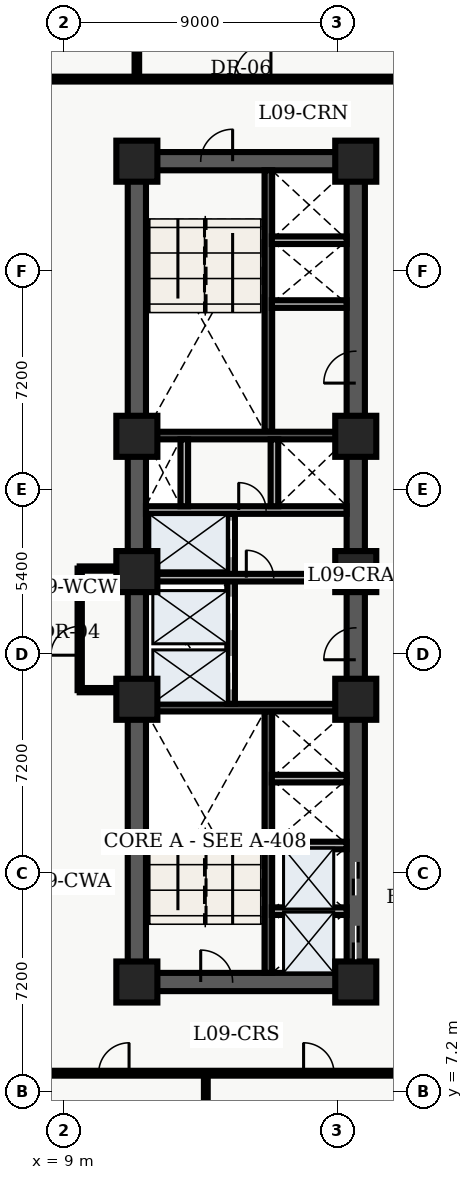
"""IFC4 building model, lengths in metres.
Left out: names, types, materials, properties, quantities, classifications, styles, units other than length and angle.
Written with IfcOpenShell. Run it as: python <this file> out.ifc"""

import sys

from ifc_helpers import new_model, entity, si_unit, converted_unit, direction, frame, origin_with_axes, origin_2d_with_axis, place, context, subcontext, project, spatial, polyline, rectangle, outline, extrude, element, fill, save


model = new_model("IFC4")
c1 = context("Model", 3, precision=1e-05, world=origin_with_axes(), true_north=direction((0.0, 1.0)))
c2 = subcontext(c1, "Body", "Model", "MODEL_VIEW")
j1 = project(units=[si_unit("LENGTHUNIT", "METRE"), converted_unit("PLANEANGLEUNIT", "DEGREE", entity("IfcPlaneAngleMeasure", 0.017), si_unit("PLANEANGLEUNIT", "RADIAN"), dimensions=[0, 0, 0, 0, 0, 0, 0])], contexts=[c1])
p1 = place(None, origin_with_axes())
s1 = spatial("IfcSite", under=j1, at=p1, CompositionType="ELEMENT")
p2 = place(p1, origin_with_axes())
s2 = spatial("IfcBuilding", under=s1, at=p2, CompositionType="ELEMENT")
p3 = place(p2, frame((0.0, 0.0, 40.5), z_axis=(0.0, 0.0, 1.0), x_axis=(1.0, 0.0, 0.0)))
s3 = spatial("IfcBuildingStorey", under=s2, at=p3, CompositionType="ELEMENT", Elevation=40.5)
p4 = place(p3, frame((11.4, 10.8, 0.0), z_axis=(0.0, 0.0, 1.0), x_axis=(0.0, 1.0, 0.0)))
e1 = element("IfcWall", 1, at=p4, inside=s3, PredefinedType="SHEAR", context=c2, shape_type="SweptSolid", body=[
    extrude(outline(polyline([(0.0, -0.3), (27.0, -0.3), (27.0, 0.3), (0.0, 0.3), (0.0, -0.3)])), origin_with_axes(), (0.0, 0.0, 1.0), 3.66),
])
p5 = place(p3, frame((11.4, 10.8, 0.0), z_axis=(0.0, 0.0, 1.0), x_axis=(1.0, 0.0, 0.0)))
e2 = element("IfcWall", 2, at=p5, inside=s3, PredefinedType="SHEAR", context=c2, shape_type="SweptSolid", body=[
    extrude(outline(polyline([(0.0, -0.3), (7.2, -0.3), (7.2, 0.3), (0.0, 0.3), (0.0, -0.3)])), origin_with_axes(), (0.0, 0.0, 1.0), 3.66),
])
p6 = place(p5, frame((2.625, 0.0, 0.0), z_axis=(0.0, 0.0, 1.0), x_axis=(1.0, 0.0, 0.0)))
e3 = element("IfcOpeningElement", 3, at=p6, cuts=e2, PredefinedType="OPENING", context=c2, shape_type="SweptSolid", body=[
    extrude(rectangle(XDim=1.05, YDim=0.62, at=origin_2d_with_axis()), origin_with_axes(), (0.0, 0.0, 1.0), 2.15),
])
p7 = place(p3, frame((11.4, 37.8, 0.0), z_axis=(0.0, 0.0, 1.0), x_axis=(1.0, 0.0, 0.0)))
e4 = element("IfcWall", 4, at=p7, inside=s3, PredefinedType="SHEAR", context=c2, shape_type="SweptSolid", body=[
    extrude(outline(polyline([(0.0, -0.3), (7.2, -0.3), (7.2, 0.3), (0.0, 0.3), (0.0, -0.3)])), origin_with_axes(), (0.0, 0.0, 1.0), 3.66),
])
p8 = place(p7, frame((2.625, 0.0, 0.0), z_axis=(0.0, 0.0, 1.0), x_axis=(1.0, 0.0, 0.0)))
e5 = element("IfcOpeningElement", 5, at=p8, cuts=e4, PredefinedType="OPENING", context=c2, shape_type="SweptSolid", body=[
    extrude(rectangle(XDim=1.05, YDim=0.62, at=origin_2d_with_axis()), origin_with_axes(), (0.0, 0.0, 1.0), 2.15),
])
p9 = place(p3, frame((18.6, 10.8, 0.0), z_axis=(0.0, 0.0, 1.0), x_axis=(0.0, 1.0, 0.0)))
e6 = element("IfcWall", 6, at=p9, inside=s3, PredefinedType="SHEAR", context=c2, shape_type="SweptSolid", body=[
    extrude(outline(polyline([(0.0, -0.3), (13.5, -0.3), (13.5, 0.3), (0.0, 0.3), (0.0, -0.3)])), origin_with_axes(), (0.0, 0.0, 1.0), 3.66),
])
p10 = place(p9, frame((1.3, 0.0, 0.0), z_axis=(0.0, 0.0, 1.0), x_axis=(1.0, 0.0, 0.0)))
e7 = element("IfcOpeningElement", 7, at=p10, cuts=e6, PredefinedType="OPENING", context=c2, shape_type="SweptSolid", body=[
    extrude(rectangle(XDim=1.1, YDim=0.62, at=origin_2d_with_axis()), origin_with_axes(), (0.0, 0.0, 1.0), 2.15),
])
p11 = place(p9, frame((3.4, 0.0, 0.0), z_axis=(0.0, 0.0, 1.0), x_axis=(1.0, 0.0, 0.0)))
e8 = element("IfcOpeningElement", 8, at=p11, cuts=e6, PredefinedType="OPENING", context=c2, shape_type="SweptSolid", body=[
    extrude(rectangle(XDim=1.1, YDim=0.62, at=origin_2d_with_axis()), origin_with_axes(), (0.0, 0.0, 1.0), 2.15),
])
p12 = place(p9, frame((11.125, 0.0, 0.0), z_axis=(0.0, 0.0, 1.0), x_axis=(1.0, 0.0, 0.0)))
e9 = element("IfcOpeningElement", 9, at=p12, cuts=e6, PredefinedType="OPENING", context=c2, shape_type="SweptSolid", body=[
    extrude(rectangle(XDim=1.05, YDim=0.62, at=origin_2d_with_axis()), origin_with_axes(), (0.0, 0.0, 1.0), 2.15),
])
p13 = place(p3, frame((18.6, 24.3, 0.0), z_axis=(0.0, 0.0, 1.0), x_axis=(0.0, 1.0, 0.0)))
e10 = element("IfcWall", 10, at=p13, inside=s3, PredefinedType="SHEAR", context=c2, shape_type="SweptSolid", body=[
    extrude(outline(polyline([(0.0, -0.3), (13.5, -0.3), (13.5, 0.3), (0.0, 0.3), (0.0, -0.3)])), origin_with_axes(), (0.0, 0.0, 1.0), 3.66),
])
p14 = place(p13, frame((6.725, 0.0, 0.0), z_axis=(0.0, 0.0, 1.0), x_axis=(1.0, 0.0, 0.0)))
e11 = element("IfcOpeningElement", 11, at=p14, cuts=e10, PredefinedType="OPENING", context=c2, shape_type="SweptSolid", body=[
    extrude(rectangle(XDim=1.05, YDim=0.62, at=origin_2d_with_axis()), origin_with_axes(), (0.0, 0.0, 1.0), 2.15),
])
p15 = place(p3, frame((15.725, 11.1, 0.0), z_axis=(0.0, 0.0, 1.0), x_axis=(0.0, 1.0, 0.0)))
e12 = element("IfcWall", 12, at=p15, inside=s3, PredefinedType="SHEAR", context=c2, shape_type="SweptSolid", body=[
    extrude(outline(polyline([(0.0, -0.125), (8.6, -0.125), (8.6, 0.125), (0.0, 0.125), (0.0, -0.125)])), origin_with_axes(), (0.0, 0.0, 1.0), 3.66),
])
p16 = place(p3, frame((11.7, 19.825, 0.0), z_axis=(0.0, 0.0, 1.0), x_axis=(1.0, 0.0, 0.0)))
e13 = element("IfcWall", 13, at=p16, inside=s3, PredefinedType="SHEAR", context=c2, shape_type="SweptSolid", body=[
    extrude(outline(polyline([(0.0, -0.125), (6.6, -0.125), (6.6, 0.125), (0.0, 0.125), (0.0, -0.125)])), origin_with_axes(), (0.0, 0.0, 1.0), 3.66),
])
p17 = place(p3, frame((15.725, 28.9, 0.0), z_axis=(0.0, 0.0, 1.0), x_axis=(0.0, 1.0, 0.0)))
e14 = element("IfcWall", 14, at=p17, inside=s3, PredefinedType="SHEAR", context=c2, shape_type="SweptSolid", body=[
    extrude(outline(polyline([(0.0, -0.125), (8.6, -0.125), (8.6, 0.125), (0.0, 0.125), (0.0, -0.125)])), origin_with_axes(), (0.0, 0.0, 1.0), 3.66),
])
p18 = place(p3, frame((11.7, 28.775, 0.0), z_axis=(0.0, 0.0, 1.0), x_axis=(1.0, 0.0, 0.0)))
e15 = element("IfcWall", 15, at=p18, inside=s3, PredefinedType="SHEAR", context=c2, shape_type="SweptSolid", body=[
    extrude(outline(polyline([(0.0, -0.125), (6.6, -0.125), (6.6, 0.125), (0.0, 0.125), (0.0, -0.125)])), origin_with_axes(), (0.0, 0.0, 1.0), 3.66),
])
p19 = place(p3, frame((14.5, 19.95, 0.0), z_axis=(0.0, 0.0, 1.0), x_axis=(0.0, 1.0, 0.0)))
e16 = element("IfcWall", 16, at=p19, inside=s3, PredefinedType="SOLIDWALL", context=c2, shape_type="SweptSolid", body=[
    extrude(outline(polyline([(0.0, -0.125), (6.25, -0.125), (6.25, 0.125), (0.0, 0.125), (0.0, -0.125)])), origin_with_axes(), (0.0, 0.0, 1.0), 2.7),
])
p20 = place(p19, frame((1.025, 0.0, 0.0), z_axis=(0.0, 0.0, 1.0), x_axis=(1.0, 0.0, 0.0)))
e17 = element("IfcOpeningElement", 17, at=p20, cuts=e16, PredefinedType="OPENING", context=c2, shape_type="SweptSolid", body=[
    extrude(rectangle(XDim=1.1, YDim=0.27, at=origin_2d_with_axis()), origin_with_axes(), (0.0, 0.0, 1.0), 2.15),
])
p21 = place(p19, frame((2.975, 0.0, 0.0), z_axis=(0.0, 0.0, 1.0), x_axis=(1.0, 0.0, 0.0)))
e18 = element("IfcOpeningElement", 18, at=p21, cuts=e16, PredefinedType="OPENING", context=c2, shape_type="SweptSolid", body=[
    extrude(rectangle(XDim=1.1, YDim=0.27, at=origin_2d_with_axis()), origin_with_axes(), (0.0, 0.0, 1.0), 2.15),
])
p22 = place(p19, frame((5.425, 0.0, 0.0), z_axis=(0.0, 0.0, 1.0), x_axis=(1.0, 0.0, 0.0)))
e19 = element("IfcOpeningElement", 19, at=p22, cuts=e16, PredefinedType="OPENING", context=c2, shape_type="SweptSolid", body=[
    extrude(rectangle(XDim=1.2, YDim=0.27, at=origin_2d_with_axis()), origin_with_axes(), (0.0, 0.0, 1.0), 2.15),
])
p23 = place(p3, frame((11.7, 24.1, 0.0), z_axis=(0.0, 0.0, 1.0), x_axis=(1.0, 0.0, 0.0)))
e20 = element("IfcWall", 20, at=p23, inside=s3, PredefinedType="SOLIDWALL", context=c2, shape_type="SweptSolid", body=[
    extrude(outline(polyline([(0.0, -0.125), (6.6, -0.125), (6.6, 0.125), (0.0, 0.125), (0.0, -0.125)])), origin_with_axes(), (0.0, 0.0, 1.0), 2.7),
])
p24 = place(p23, frame((3.75, 0.0, 0.0), z_axis=(0.0, 0.0, 1.0), x_axis=(1.0, 0.0, 0.0)))
e21 = element("IfcOpeningElement", 21, at=p24, cuts=e20, PredefinedType="OPENING", context=c2, shape_type="SweptSolid", body=[
    extrude(rectangle(XDim=0.9, YDim=0.27, at=origin_2d_with_axis()), origin_with_axes(), (0.0, 0.0, 1.0), 2.15),
])
p25 = place(p3, frame((11.7, 26.325, 0.0), z_axis=(0.0, 0.0, 1.0), x_axis=(1.0, 0.0, 0.0)))
e22 = element("IfcWall", 22, at=p25, inside=s3, PredefinedType="SOLIDWALL", context=c2, shape_type="SweptSolid", body=[
    extrude(outline(polyline([(0.0, -0.125), (6.6, -0.125), (6.6, 0.125), (0.0, 0.125), (0.0, -0.125)])), origin_with_axes(), (0.0, 0.0, 1.0), 2.7),
])
p26 = place(p25, frame((3.5, 0.0, 0.0), z_axis=(0.0, 0.0, 1.0), x_axis=(1.0, 0.0, 0.0)))
e23 = element("IfcOpeningElement", 23, at=p26, cuts=e22, PredefinedType="OPENING", context=c2, shape_type="SweptSolid", body=[
    extrude(rectangle(XDim=0.9, YDim=0.27, at=origin_2d_with_axis()), origin_with_axes(), (0.0, 0.0, 1.0), 2.15),
])
for number, where, z_axis, x_axis in (
    (24, (12.96, 26.45, 0.0), (0.0, 0.0, 1.0), (0.0, 1.0, 0.0)),
    (25, (15.925, 26.45, 0.0), (0.0, 0.0, 1.0), (0.0, 1.0, 0.0)),
):
    element("IfcWall", number, at=place(p3, frame(where, z_axis=z_axis, x_axis=x_axis)), inside=s3, PredefinedType="SOLIDWALL", context=c2, shape_type="SweptSolid", body=[
        extrude(outline(polyline([(0.0, -0.125), (2.2, -0.125), (2.2, 0.125), (0.0, 0.125), (0.0, -0.125)])), origin_with_axes(), (0.0, 0.0, 1.0), 2.7),
    ])
for number, where, z_axis, x_axis in (
    (26, (11.4, 10.8, 0.0), (0.0, 0.0, 1.0), (1.0, 0.0, 0.0)),
    (27, (11.4, 20.1, 0.0), (0.0, 0.0, 1.0), (1.0, 0.0, 0.0)),
    (28, (11.4, 24.3, 0.0), (0.0, 0.0, 1.0), (1.0, 0.0, 0.0)),
    (29, (11.4, 28.75, 0.0), (0.0, 0.0, 1.0), (1.0, 0.0, 0.0)),
    (30, (11.4, 37.8, 0.0), (0.0, 0.0, 1.0), (1.0, 0.0, 0.0)),
    (31, (18.6, 10.8, 0.0), (0.0, 0.0, 1.0), (1.0, 0.0, 0.0)),
    (32, (18.6, 20.1, 0.0), (0.0, 0.0, 1.0), (1.0, 0.0, 0.0)),
    (33, (18.6, 24.3, 0.0), (0.0, 0.0, 1.0), (1.0, 0.0, 0.0)),
    (34, (18.6, 28.75, 0.0), (0.0, 0.0, 1.0), (1.0, 0.0, 0.0)),
    (35, (18.6, 37.8, 0.0), (0.0, 0.0, 1.0), (1.0, 0.0, 0.0)),
):
    element("IfcColumn", number, at=place(p3, frame(where, z_axis=z_axis, x_axis=x_axis)), inside=s3, PredefinedType="COLUMN", context=c2, shape_type="SweptSolid", body=[
        extrude(rectangle(XDim=1.35, YDim=1.35, at=origin_2d_with_axis()), origin_with_axes(), (0.0, 0.0, 1.0), 3.9),
    ])
for number, where, z_axis, x_axis in (
    (36, (15.84, 13.13, 0.0), (0.0, 0.0, 1.0), (1.0, 0.0, 0.0)),
    (37, (15.84, 15.29, 0.0), (0.0, 0.0, 1.0), (1.0, 0.0, 0.0)),
    (38, (15.84, 17.49, 0.0), (0.0, 0.0, 1.0), (1.0, 0.0, 0.0)),
    (39, (15.84, 33.1, 0.0), (0.0, 0.0, 1.0), (1.0, 0.0, 0.0)),
    (40, (15.84, 35.2, 0.0), (0.0, 0.0, 1.0), (1.0, 0.0, 0.0)),
):
    element("IfcWall", number, at=place(p3, frame(where, z_axis=z_axis, x_axis=x_axis)), inside=s3, PredefinedType="SOLIDWALL", context=c2, shape_type="SweptSolid", body=[
        extrude(outline(polyline([(0.0, -0.125), (2.46, -0.125), (2.46, 0.125), (0.0, 0.125), (0.0, -0.125)])), origin_with_axes(), (0.0, 0.0, 1.0), 2.7),
    ])
p27 = place(p3, frame((9.52, 20.4, 0.0), z_axis=(0.0, 0.0, 1.0), x_axis=(0.0, 1.0, 0.0)))
e41 = element("IfcWall", 41, at=p27, inside=s3, PredefinedType="PARTITIONING", context=c2, shape_type="SweptSolid", body=[
    extrude(outline(polyline([(0.0, -0.07), (4.0, -0.07), (4.0, 0.07), (0.0, 0.07), (0.0, -0.07)])), origin_with_axes(), (0.0, 0.0, 1.0), 2.7),
])
p28 = place(p27, frame((1.625, 0.0, 0.0), z_axis=(0.0, 0.0, 1.0), x_axis=(1.0, 0.0, 0.0)))
e42 = element("IfcOpeningElement", 42, at=p28, cuts=e41, PredefinedType="OPENING", context=c2, shape_type="SweptSolid", body=[
    extrude(rectangle(XDim=0.95, YDim=0.16, at=origin_2d_with_axis()), origin_with_axes(), (0.0, 0.0, 1.0), 2.15),
])
for number, where, z_axis, x_axis in (
    (43, (9.52, 20.4, 0.0), (0.0, 0.0, 1.0), (1.0, 0.0, 0.0)),
    (44, (9.52, 24.4, 0.0), (0.0, 0.0, 1.0), (1.0, 0.0, 0.0)),
):
    element("IfcWall", number, at=place(p3, frame(where, z_axis=z_axis, x_axis=x_axis)), inside=s3, PredefinedType="PARTITIONING", context=c2, shape_type="SweptSolid", body=[
        extrude(outline(polyline([(0.0, -0.07), (1.58, -0.07), (1.58, 0.07), (0.0, 0.07), (0.0, -0.07)])), origin_with_axes(), (0.0, 0.0, 1.0), 2.7),
    ])
p29 = place(p3, frame((2.6, 7.8, 0.0), z_axis=(0.0, 0.0, 1.0), x_axis=(1.0, 0.0, 0.0)))
e45 = element("IfcWall", 45, at=p29, inside=s3, PredefinedType="PARTITIONING", context=c2, shape_type="SweptSolid", body=[
    extrude(outline(polyline([(0.0, -0.08), (18.55, -0.08), (18.55, 0.08), (0.0, 0.08), (0.0, -0.08)])), origin_with_axes(), (0.0, 0.0, 1.0), 2.7),
])
p30 = place(p29, frame((2.225, 0.0, 0.0), z_axis=(0.0, 0.0, 1.0), x_axis=(1.0, 0.0, 0.0)))
e46 = element("IfcOpeningElement", 46, at=p30, cuts=e45, PredefinedType="OPENING", context=c2, shape_type="SweptSolid", body=[
    extrude(rectangle(XDim=1.0, YDim=0.18, at=origin_2d_with_axis()), origin_with_axes(), (0.0, 0.0, 1.0), 2.15),
])
p31 = place(p29, frame((8.043, 0.0, 0.0), z_axis=(0.0, 0.0, 1.0), x_axis=(1.0, 0.0, 0.0)))
e47 = element("IfcOpeningElement", 47, at=p31, cuts=e45, PredefinedType="OPENING", context=c2, shape_type="SweptSolid", body=[
    extrude(rectangle(XDim=1.0, YDim=0.18, at=origin_2d_with_axis()), origin_with_axes(), (0.0, 0.0, 1.0), 2.15),
])
p32 = place(p29, frame((14.784, 0.0, 0.0), z_axis=(0.0, 0.0, 1.0), x_axis=(1.0, 0.0, 0.0)))
e48 = element("IfcOpeningElement", 48, at=p32, cuts=e45, PredefinedType="OPENING", context=c2, shape_type="SweptSolid", body=[
    extrude(rectangle(XDim=1.0, YDim=0.18, at=origin_2d_with_axis()), origin_with_axes(), (0.0, 0.0, 1.0), 2.15),
])
p33 = place(p3, frame((2.6, 40.5, 0.0), z_axis=(0.0, 0.0, 1.0), x_axis=(1.0, 0.0, 0.0)))
e49 = element("IfcWall", 49, at=p33, inside=s3, PredefinedType="PARTITIONING", context=c2, shape_type="SweptSolid", body=[
    extrude(outline(polyline([(0.0, -0.08), (18.65, -0.08), (18.65, 0.08), (0.0, 0.08), (0.0, -0.08)])), origin_with_axes(), (0.0, 0.0, 1.0), 2.7),
])
p34 = place(p33, frame((5.275, 0.0, 0.0), z_axis=(0.0, 0.0, 1.0), x_axis=(1.0, 0.0, 0.0)))
e50 = element("IfcOpeningElement", 50, at=p34, cuts=e49, PredefinedType="OPENING", context=c2, shape_type="SweptSolid", body=[
    extrude(rectangle(XDim=1.0, YDim=0.18, at=origin_2d_with_axis()), origin_with_axes(), (0.0, 0.0, 1.0), 2.15),
])
p35 = place(p33, frame((12.61, 0.0, 0.0), z_axis=(0.0, 0.0, 1.0), x_axis=(1.0, 0.0, 0.0)))
e51 = element("IfcOpeningElement", 51, at=p35, cuts=e49, PredefinedType="OPENING", context=c2, shape_type="SweptSolid", body=[
    extrude(rectangle(XDim=1.2, YDim=0.18, at=origin_2d_with_axis()), origin_with_axes(), (0.0, 0.0, 1.0), 2.2),
])
p36 = place(p3, frame((13.668, 0.36, 0.0), z_axis=(0.0, 0.0, 1.0), x_axis=(0.0, 1.0, 0.0)))
e52 = element("IfcWall", 52, at=p36, inside=s3, PredefinedType="PARTITIONING", context=c2, shape_type="SweptSolid", body=[
    extrude(outline(polyline([(0.0, -0.062), (7.34, -0.062), (7.34, 0.062), (0.0, 0.062), (0.0, -0.062)])), origin_with_axes(), (0.0, 0.0, 1.0), 2.7),
])
p37 = place(p3, frame((11.4, 40.6, 0.0), z_axis=(0.0, 0.0, 1.0), x_axis=(0.0, 1.0, 0.0)))
e53 = element("IfcWall", 53, at=p37, inside=s3, PredefinedType="PARTITIONING", context=c2, shape_type="SweptSolid", body=[
    extrude(outline(polyline([(0.0, -0.075), (7.64, -0.075), (7.64, 0.075), (0.0, 0.075), (0.0, -0.075)])), origin_with_axes(), (0.0, 0.0, 1.0), 2.7),
])
p38 = place(p9, frame((1.3, 0.0, 0.0), z_axis=(0.0, 0.0, 1.0), x_axis=(1.0, 0.0, 0.0)))
e54 = element("IfcDoor", 54, at=p38, inside=s3, OperationType="SLIDING_TO_LEFT", PredefinedType="DOOR", context=c2, shape_type="SweptSolid", body=[
    extrude(rectangle(XDim=1.1, YDim=0.09, at=origin_2d_with_axis()), origin_with_axes(), (0.0, 0.0, 1.0), 2.15),
])
fill(e7, e54)
p39 = place(p9, frame((3.4, 0.0, 0.0), z_axis=(0.0, 0.0, 1.0), x_axis=(1.0, 0.0, 0.0)))
e55 = element("IfcDoor", 55, at=p39, inside=s3, OperationType="SLIDING_TO_RIGHT", PredefinedType="DOOR", context=c2, shape_type="SweptSolid", body=[
    extrude(rectangle(XDim=1.1, YDim=0.09, at=origin_2d_with_axis()), origin_with_axes(), (0.0, 0.0, 1.0), 2.15),
])
fill(e8, e55)
p40 = place(p19, frame((1.025, 0.0, 0.0), z_axis=(0.0, 0.0, 1.0), x_axis=(1.0, 0.0, 0.0)))
e56 = element("IfcDoor", 56, at=p40, inside=s3, OperationType="SLIDING_TO_LEFT", PredefinedType="DOOR", context=c2, shape_type="SweptSolid", body=[
    extrude(rectangle(XDim=1.1, YDim=0.09, at=origin_2d_with_axis()), origin_with_axes(), (0.0, 0.0, 1.0), 2.15),
])
fill(e17, e56)
p41 = place(p19, frame((2.975, 0.0, 0.0), z_axis=(0.0, 0.0, 1.0), x_axis=(1.0, 0.0, 0.0)))
e57 = element("IfcDoor", 57, at=p41, inside=s3, OperationType="SLIDING_TO_RIGHT", PredefinedType="DOOR", context=c2, shape_type="SweptSolid", body=[
    extrude(rectangle(XDim=1.1, YDim=0.09, at=origin_2d_with_axis()), origin_with_axes(), (0.0, 0.0, 1.0), 2.15),
])
fill(e18, e57)
p42 = place(p19, frame((5.425, 0.0, 0.0), z_axis=(0.0, 0.0, 1.0), x_axis=(1.0, 0.0, 0.0)))
e58 = element("IfcDoor", 58, at=p42, inside=s3, OperationType="DOUBLE_DOOR_SLIDING", PredefinedType="DOOR", context=c2, shape_type="SweptSolid", body=[
    extrude(rectangle(XDim=1.2, YDim=0.09, at=origin_2d_with_axis()), origin_with_axes(), (0.0, 0.0, 1.0), 2.15),
])
fill(e19, e58)
p43 = place(p5, frame((2.625, 0.0, 0.0), z_axis=(0.0, 0.0, 1.0), x_axis=(1.0, 0.0, 0.0)))
e59 = element("IfcDoor", 59, at=p43, inside=s3, OperationType="SINGLE_SWING_LEFT", PredefinedType="DOOR", context=c2, shape_type="SweptSolid", body=[
    extrude(rectangle(XDim=1.05, YDim=0.09, at=origin_2d_with_axis()), origin_with_axes(), (0.0, 0.0, 1.0), 2.15),
])
fill(e3, e59)
p44 = place(p7, frame((2.625, 0.0, 0.0), z_axis=(0.0, 0.0, 1.0), x_axis=(1.0, 0.0, 0.0)))
e60 = element("IfcDoor", 60, at=p44, inside=s3, OperationType="SINGLE_SWING_RIGHT", PredefinedType="DOOR", context=c2, shape_type="SweptSolid", body=[
    extrude(rectangle(XDim=1.05, YDim=0.09, at=origin_2d_with_axis()), origin_with_axes(), (0.0, 0.0, 1.0), 2.15),
])
fill(e5, e60)
p45 = place(p9, frame((11.125, 0.0, 0.0), z_axis=(0.0, 0.0, 1.0), x_axis=(1.0, 0.0, 0.0)))
e61 = element("IfcDoor", 61, at=p45, inside=s3, OperationType="SINGLE_SWING_LEFT", PredefinedType="DOOR", context=c2, shape_type="SweptSolid", body=[
    extrude(rectangle(XDim=1.05, YDim=0.09, at=origin_2d_with_axis()), origin_with_axes(), (0.0, 0.0, 1.0), 2.15),
])
fill(e9, e61)
p46 = place(p23, frame((3.75, 0.0, 0.0), z_axis=(0.0, 0.0, 1.0), x_axis=(1.0, 0.0, 0.0)))
e62 = element("IfcDoor", 62, at=p46, inside=s3, OperationType="SINGLE_SWING_LEFT", PredefinedType="DOOR", context=c2, shape_type="SweptSolid", body=[
    extrude(rectangle(XDim=0.9, YDim=0.09, at=origin_2d_with_axis()), origin_with_axes(), (0.0, 0.0, 1.0), 2.15),
])
fill(e21, e62)
p47 = place(p25, frame((3.5, 0.0, 0.0), z_axis=(0.0, 0.0, 1.0), x_axis=(1.0, 0.0, 0.0)))
e63 = element("IfcDoor", 63, at=p47, inside=s3, OperationType="SINGLE_SWING_LEFT", PredefinedType="DOOR", context=c2, shape_type="SweptSolid", body=[
    extrude(rectangle(XDim=0.9, YDim=0.09, at=origin_2d_with_axis()), origin_with_axes(), (0.0, 0.0, 1.0), 2.15),
])
fill(e23, e63)
p48 = place(p13, frame((6.725, 0.0, 0.0), z_axis=(0.0, 0.0, 1.0), x_axis=(1.0, 0.0, 0.0)))
e64 = element("IfcDoor", 64, at=p48, inside=s3, OperationType="SINGLE_SWING_LEFT", PredefinedType="DOOR", context=c2, shape_type="SweptSolid", body=[
    extrude(rectangle(XDim=1.05, YDim=0.09, at=origin_2d_with_axis()), origin_with_axes(), (0.0, 0.0, 1.0), 2.15),
])
fill(e11, e64)
p49 = place(p27, frame((1.625, 0.0, 0.0), z_axis=(0.0, 0.0, 1.0), x_axis=(1.0, 0.0, 0.0)))
e65 = element("IfcDoor", 65, at=p49, inside=s3, OperationType="SINGLE_SWING_LEFT", PredefinedType="DOOR", context=c2, shape_type="SweptSolid", body=[
    extrude(rectangle(XDim=0.95, YDim=0.084, at=origin_2d_with_axis()), origin_with_axes(), (0.0, 0.0, 1.0), 2.15),
])
fill(e42, e65)
p50 = place(p29, frame((8.043, 0.0, 0.0), z_axis=(0.0, 0.0, 1.0), x_axis=(1.0, 0.0, 0.0)))
e66 = element("IfcDoor", 66, at=p50, inside=s3, OperationType="SINGLE_SWING_RIGHT", PredefinedType="DOOR", context=c2, shape_type="SweptSolid", body=[
    extrude(rectangle(XDim=1.0, YDim=0.09, at=origin_2d_with_axis()), origin_with_axes(), (0.0, 0.0, 1.0), 2.15),
])
fill(e47, e66)
p51 = place(p29, frame((14.784, 0.0, 0.0), z_axis=(0.0, 0.0, 1.0), x_axis=(1.0, 0.0, 0.0)))
e67 = element("IfcDoor", 67, at=p51, inside=s3, OperationType="SINGLE_SWING_LEFT", PredefinedType="DOOR", context=c2, shape_type="SweptSolid", body=[
    extrude(rectangle(XDim=1.0, YDim=0.09, at=origin_2d_with_axis()), origin_with_axes(), (0.0, 0.0, 1.0), 2.15),
])
fill(e48, e67)
p52 = place(p33, frame((12.61, 0.0, 0.0), z_axis=(0.0, 0.0, 1.0), x_axis=(1.0, 0.0, 0.0)))
e68 = element("IfcDoor", 68, at=p52, inside=s3, OperationType="SINGLE_SWING_RIGHT", PredefinedType="DOOR", context=c2, shape_type="SweptSolid", body=[
    extrude(rectangle(XDim=1.2, YDim=0.09, at=origin_2d_with_axis()), origin_with_axes(), (0.0, 0.0, 1.0), 2.2),
])
fill(e51, e68)
save(model, sys.argv[1])
